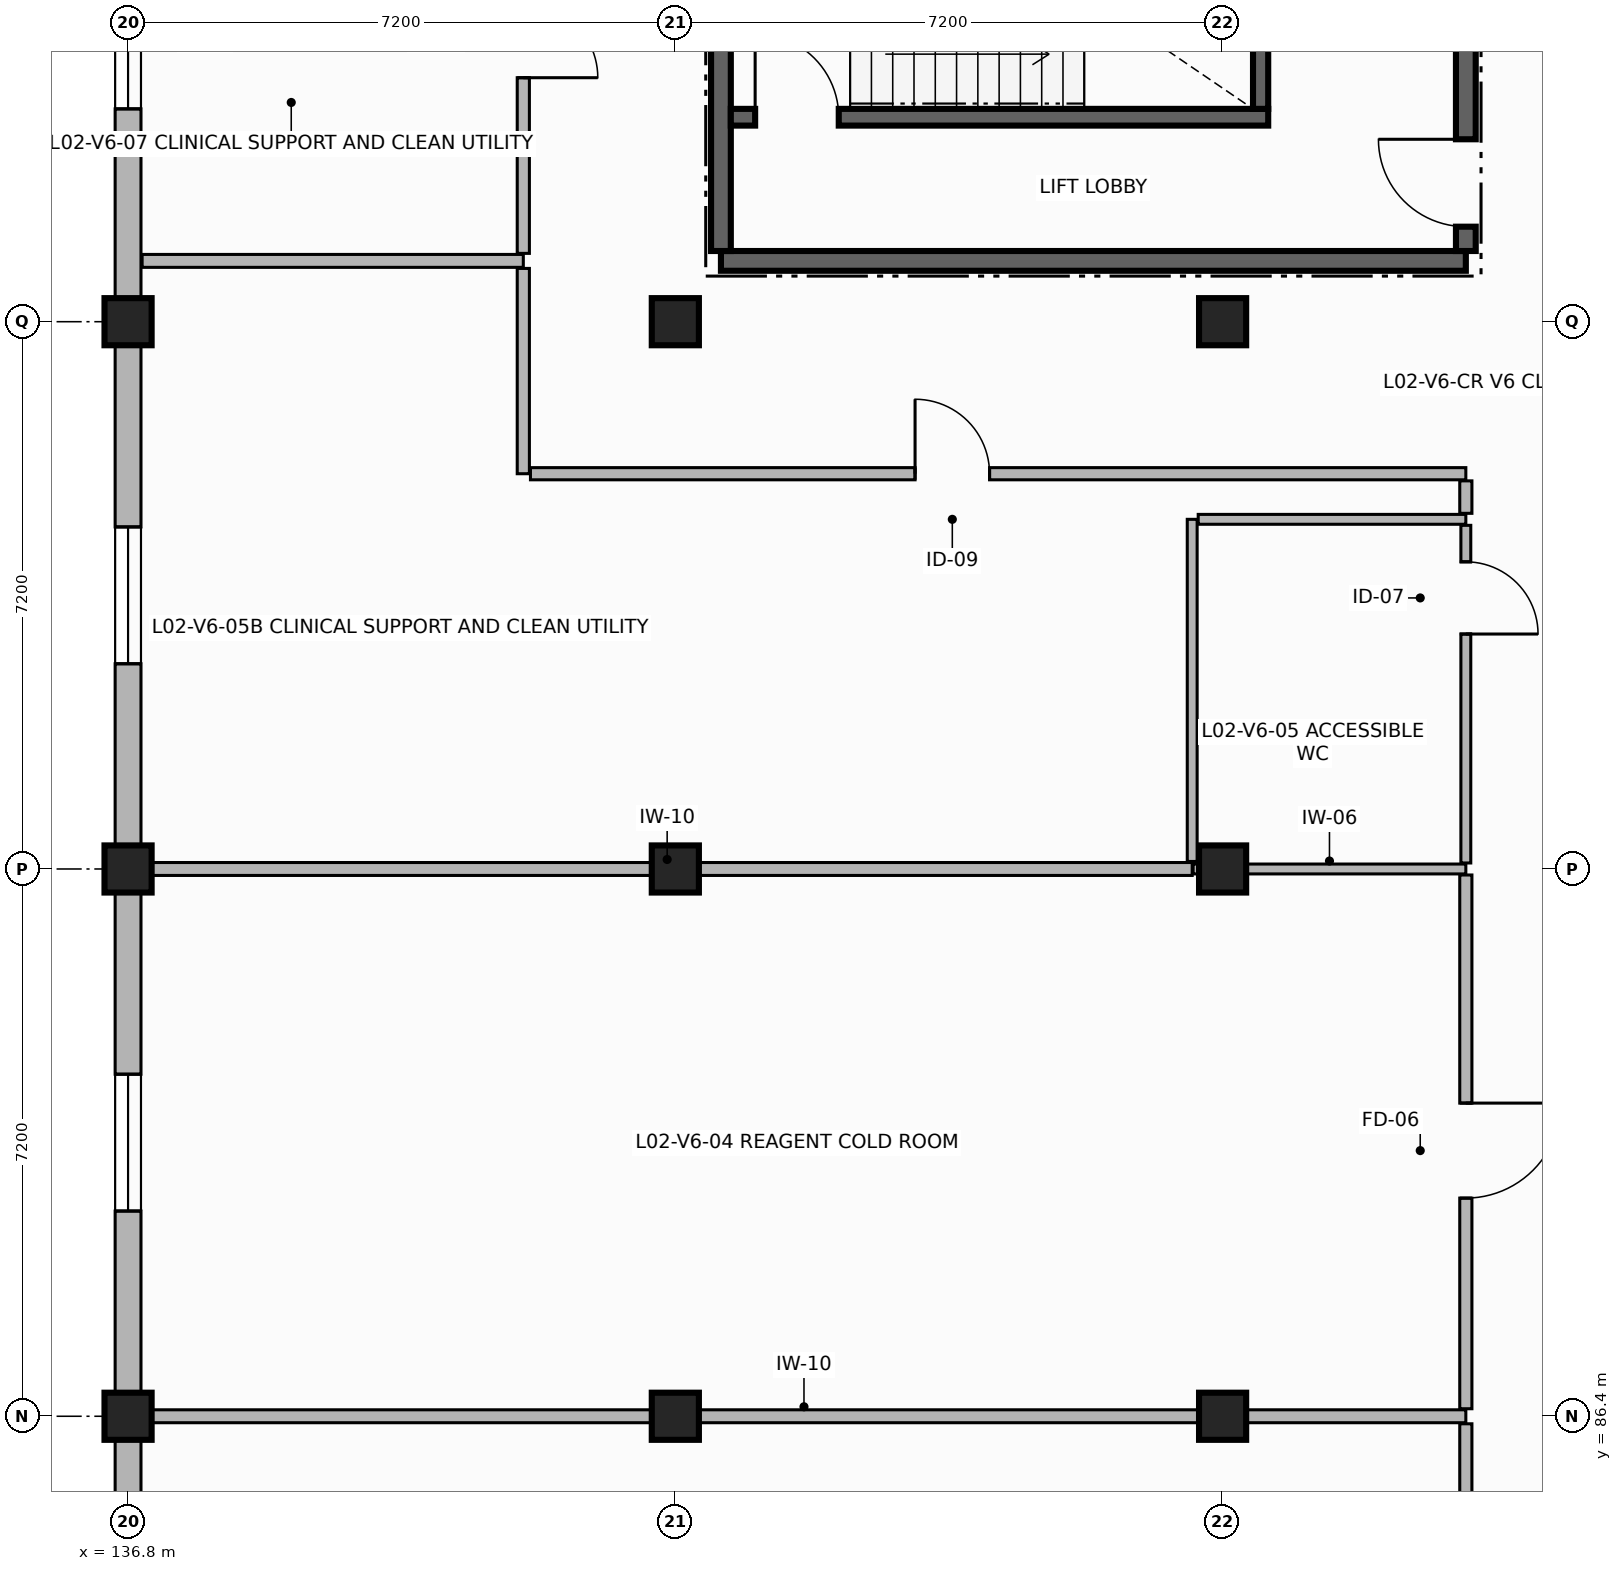
"""IFC4 building model, lengths in metres.
Left out: names, types, materials, properties, quantities, classifications, styles, units other than length and angle.
Written with IfcOpenShell. Run it as: python <this file> out.ifc"""

import sys

from ifc_helpers import new_model, si_unit, direction, frame, frame_2d, origin, origin_2d, place, context, subcontext, project, spatial, rectangle, extrude, element, fill, save


model = new_model("IFC4")
c1 = context("Model", 3, precision=1e-05, world=origin(), true_north=direction((0.0, 1.0)))
c2 = subcontext(c1, "Body", "Model", "MODEL_VIEW")
j1 = project(units=[si_unit("LENGTHUNIT", "METRE"), si_unit("PLANEANGLEUNIT", "RADIAN")], contexts=[c1])
p1 = place(None, origin())
s1 = spatial("IfcSite", under=j1, at=p1, CompositionType="ELEMENT")
p2 = place(p1, origin())
s2 = spatial("IfcBuilding", under=s1, at=p2, CompositionType="ELEMENT")
p3 = place(p2, frame((0.0, 0.0, 8.4)))
s3 = spatial("IfcBuildingStorey", under=s2, at=p3, CompositionType="ELEMENT", Elevation=8.4)
for number, where, z_axis, x_axis in (
    (1, (136.8, 86.4, 0.0), (0.0, 0.0, 1.0), (1.0, 0.0, 0.0)),
    (2, (136.8, 93.6, 0.0), (0.0, 0.0, 1.0), (1.0, 0.0, 0.0)),
    (3, (136.8, 100.8, 0.0), (0.0, 0.0, 1.0), (1.0, 0.0, 0.0)),
    (4, (144.0, 86.4, 0.0), (0.0, 0.0, 1.0), (1.0, 0.0, 0.0)),
    (5, (144.0, 93.6, 0.0), (0.0, 0.0, 1.0), (1.0, 0.0, 0.0)),
    (6, (144.0, 100.8, 0.0), (0.0, 0.0, 1.0), (1.0, 0.0, 0.0)),
    (7, (151.2, 86.4, 0.0), (0.0, 0.0, 1.0), (1.0, 0.0, 0.0)),
    (8, (151.2, 93.6, 0.0), (0.0, 0.0, 1.0), (1.0, 0.0, 0.0)),
    (9, (151.2, 100.8, 0.0), (0.0, 0.0, 1.0), (1.0, 0.0, 0.0)),
):
    element("IfcColumn", number, at=place(p3, frame(where, z_axis=z_axis, x_axis=x_axis)), inside=s3, PredefinedType="COLUMN", context=c2, shape_type="SweptSolid", body=[
        extrude(rectangle(XDim=0.62, YDim=0.62, at=origin_2d()), origin(), (0.0, 0.0, 1.0), 3.58),
    ])
p4 = place(p3, frame((136.8, 108.0, 0.0), z_axis=(0.0, 0.0, 1.0), x_axis=(0.0, -1.0, 0.0)))
e10 = element("IfcWall", 10, at=p4, inside=s3, PredefinedType="SOLIDWALL", context=c2, shape_type="SweptSolid", body=[
    extrude(rectangle(XDim=7.2, YDim=0.34, at=frame_2d((3.6, 0.0))), origin(), (0.0, 0.0, 1.0), 2.91),
])
p5 = place(p4, frame((2.6, 0.0, 0.85)))
e11 = element("IfcOpeningElement", 11, at=p5, cuts=e10, PredefinedType="OPENING", context=c2, shape_type="SweptSolid", body=[
    extrude(rectangle(XDim=1.8, YDim=1.85, at=frame_2d((0.9, 0.925))), frame((0.0, 0.18, 0.0), z_axis=(0.0, -1.0, 0.0), x_axis=(1.0, 0.0, 0.0)), (0.0, 0.0, 1.0), 0.36),
])
p6 = place(p3, frame((136.8, 100.8, 0.0), z_axis=(0.0, 0.0, 1.0), x_axis=(0.0, -1.0, 0.0)))
e12 = element("IfcWall", 12, at=p6, inside=s3, PredefinedType="SOLIDWALL", context=c2, shape_type="SweptSolid", body=[
    extrude(rectangle(XDim=7.2, YDim=0.34, at=frame_2d((3.6, 0.0))), origin(), (0.0, 0.0, 1.0), 2.91),
])
p7 = place(p6, frame((2.7, 0.0, 0.85)))
e13 = element("IfcOpeningElement", 13, at=p7, cuts=e12, PredefinedType="OPENING", context=c2, shape_type="SweptSolid", body=[
    extrude(rectangle(XDim=1.8, YDim=1.85, at=frame_2d((0.9, 0.925))), frame((0.0, 0.18, 0.0), z_axis=(0.0, -1.0, 0.0), x_axis=(1.0, 0.0, 0.0)), (0.0, 0.0, 1.0), 0.36),
])
p8 = place(p3, frame((136.8, 93.6, 0.0), z_axis=(0.0, 0.0, 1.0), x_axis=(0.0, -1.0, 0.0)))
e14 = element("IfcWall", 14, at=p8, inside=s3, PredefinedType="SOLIDWALL", context=c2, shape_type="SweptSolid", body=[
    extrude(rectangle(XDim=7.2, YDim=0.34, at=frame_2d((3.6, 0.0))), origin(), (0.0, 0.0, 1.0), 2.91),
])
p9 = place(p8, frame((2.7, 0.0, 0.85)))
e15 = element("IfcOpeningElement", 15, at=p9, cuts=e14, PredefinedType="OPENING", context=c2, shape_type="SweptSolid", body=[
    extrude(rectangle(XDim=1.8, YDim=1.85, at=frame_2d((0.9, 0.925))), frame((0.0, 0.18, 0.0), z_axis=(0.0, -1.0, 0.0), x_axis=(1.0, 0.0, 0.0)), (0.0, 0.0, 1.0), 0.36),
])
p10 = place(p3, frame((136.8, 86.4, 0.0), z_axis=(0.0, 0.0, 1.0), x_axis=(0.0, -1.0, 0.0)))
e16 = element("IfcWall", 16, at=p10, inside=s3, PredefinedType="SOLIDWALL", context=c2, shape_type="SweptSolid", body=[
    extrude(rectangle(XDim=7.2, YDim=0.34, at=frame_2d((3.6, 0.0))), origin(), (0.0, 0.0, 1.0), 2.91),
])
p11 = place(p10, frame((2.7, 0.0, 0.85)))
e17 = element("IfcOpeningElement", 17, at=p11, cuts=e16, PredefinedType="OPENING", context=c2, shape_type="SweptSolid", body=[
    extrude(rectangle(XDim=1.8, YDim=1.85, at=frame_2d((0.9, 0.925))), frame((0.0, 0.18, 0.0), z_axis=(0.0, -1.0, 0.0), x_axis=(1.0, 0.0, 0.0)), (0.0, 0.0, 1.0), 0.36),
])
p12 = place(p3, frame((144.6, 101.6, 0.0), z_axis=(0.0, 0.0, 1.0), x_axis=(1.0, 0.0, 0.0)))
e18 = element("IfcWall", 18, at=p12, inside=s3, PredefinedType="SHEAR", context=c2, shape_type="SweptSolid", body=[
    extrude(rectangle(XDim=9.8, YDim=0.26, at=frame_2d((4.9, 0.0))), origin(), (0.0, 0.0, 1.0), 3.58),
])
p13 = place(p3, frame((154.4, 101.73, 0.0), z_axis=(0.0, 0.0, 1.0), x_axis=(0.0, 1.0, 0.0)))
e19 = element("IfcWall", 19, at=p13, inside=s3, PredefinedType="SHEAR", context=c2, shape_type="SweptSolid", body=[
    extrude(rectangle(XDim=5.54, YDim=0.26, at=frame_2d((2.77, 0.0))), origin(), (0.0, 0.0, 1.0), 3.58),
])
p14 = place(p13, frame((0.32, 0.0, 0.0)))
e20 = element("IfcOpeningElement", 20, at=p14, cuts=e19, PredefinedType="OPENING", context=c2, shape_type="SweptSolid", body=[
    extrude(rectangle(XDim=1.15, YDim=2.2, at=frame_2d((0.575, 1.1))), frame((0.0, 0.14, 0.0), z_axis=(0.0, -1.0, 0.0), x_axis=(1.0, 0.0, 0.0)), (0.0, 0.0, 1.0), 0.28),
])
p15 = place(p3, frame((144.6, 107.27, 0.0), z_axis=(0.0, 0.0, 1.0), x_axis=(0.0, -1.0, 0.0)))
e21 = element("IfcWall", 21, at=p15, inside=s3, PredefinedType="SHEAR", context=c2, shape_type="SweptSolid", body=[
    extrude(rectangle(XDim=5.54, YDim=0.26, at=frame_2d((2.77, 0.0))), origin(), (0.0, 0.0, 1.0), 3.58),
])
p16 = place(p3, frame((144.73, 103.49, 0.0), z_axis=(0.0, 0.0, 1.0), x_axis=(1.0, 0.0, 0.0)))
e22 = element("IfcWall", 22, at=p16, inside=s3, PredefinedType="SHEAR", context=c2, shape_type="SweptSolid", body=[
    extrude(rectangle(XDim=7.07, YDim=0.22, at=frame_2d((3.535, 0.0))), origin(), (0.0, 0.0, 1.0), 3.58),
])
p17 = place(p16, frame((0.32, 0.0, 0.0)))
e23 = element("IfcOpeningElement", 23, at=p17, cuts=e22, PredefinedType="OPENING", context=c2, shape_type="SweptSolid", body=[
    extrude(rectangle(XDim=1.1, YDim=2.15, at=frame_2d((0.55, 1.075))), frame((0.0, 0.12, 0.0), z_axis=(0.0, -1.0, 0.0), x_axis=(1.0, 0.0, 0.0)), (0.0, 0.0, 1.0), 0.24),
])
p18 = place(p3, frame((151.7, 103.6, 0.0), z_axis=(0.0, 0.0, 1.0), x_axis=(0.0, 1.0, 0.0)))
e24 = element("IfcWall", 24, at=p18, inside=s3, PredefinedType="SHEAR", context=c2, shape_type="SweptSolid", body=[
    extrude(rectangle(XDim=3.67, YDim=0.2, at=frame_2d((1.835, 0.0))), origin(), (0.0, 0.0, 1.0), 3.58),
])
p19 = place(p3, frame((136.985, 86.4, 0.0), z_axis=(0.0, 0.0, 1.0), x_axis=(1.0, 0.0, 0.0)))
e25 = element("IfcWall", 25, at=p19, inside=s3, PredefinedType="PARTITIONING", context=c2, shape_type="SweptSolid", body=[
    extrude(rectangle(XDim=17.415, YDim=0.17, at=frame_2d((8.708, 0.0))), origin(), (0.0, 0.0, 1.0), 2.89),
])
p20 = place(p3, frame((154.4, 86.301, 0.0), z_axis=(0.0, 0.0, 1.0), x_axis=(0.0, -1.0, 0.0)))
e26 = element("IfcWall", 26, at=p20, inside=s3, PredefinedType="PARTITIONING", context=c2, shape_type="SweptSolid", body=[
    extrude(rectangle(XDim=7.556, YDim=0.16, at=frame_2d((3.778, 0.0))), origin(), (0.0, 0.0, 1.0), 2.89),
])
p21 = place(p20, frame((2.848, 0.0, 0.0)))
e27 = element("IfcOpeningElement", 27, at=p21, cuts=e26, PredefinedType="OPENING", context=c2, shape_type="SweptSolid", body=[
    extrude(rectangle(XDim=1.15, YDim=2.25, at=frame_2d((0.575, 1.125))), frame((0.0, 0.09, 0.0), z_axis=(0.0, -1.0, 0.0), x_axis=(1.0, 0.0, 0.0)), (0.0, 0.0, 1.0), 0.18),
])
p22 = place(p3, frame((136.985, 93.6, 0.0), z_axis=(0.0, 0.0, 1.0), x_axis=(1.0, 0.0, 0.0)))
e28 = element("IfcWall", 28, at=p22, inside=s3, PredefinedType="PARTITIONING", context=c2, shape_type="SweptSolid", body=[
    extrude(rectangle(XDim=13.815, YDim=0.17, at=frame_2d((6.907, 0.0))), origin(), (0.0, 0.0, 1.0), 2.89),
])
p23 = place(p3, frame((150.812, 93.6, 0.0), z_axis=(0.0, 0.0, 1.0), x_axis=(1.0, 0.0, 0.0)))
e29 = element("IfcWall", 29, at=p23, inside=s3, PredefinedType="PARTITIONING", context=c2, shape_type="SweptSolid", body=[
    extrude(rectangle(XDim=3.588, YDim=0.13, at=frame_2d((1.794, 0.0))), origin(), (0.0, 0.0, 1.0), 2.89),
])
p24 = place(p3, frame((154.4, 93.521, 0.0), z_axis=(0.0, 0.0, 1.0), x_axis=(0.0, -1.0, 0.0)))
e30 = element("IfcWall", 30, at=p24, inside=s3, PredefinedType="PARTITIONING", context=c2, shape_type="SweptSolid", body=[
    extrude(rectangle(XDim=7.022, YDim=0.16, at=frame_2d((3.511, 0.0))), origin(), (0.0, 0.0, 1.0), 2.89),
])
p25 = place(p24, frame((3.001, 0.0, 0.0)))
e31 = element("IfcOpeningElement", 31, at=p25, cuts=e30, PredefinedType="OPENING", context=c2, shape_type="SweptSolid", body=[
    extrude(rectangle(XDim=1.25, YDim=2.2, at=frame_2d((0.625, 1.1))), frame((0.0, 0.09, 0.0), z_axis=(0.0, -1.0, 0.0), x_axis=(1.0, 0.0, 0.0)), (0.0, 0.0, 1.0), 0.18),
])
p26 = place(p3, frame((150.8, 93.699, 0.0), z_axis=(0.0, 0.0, 1.0), x_axis=(0.0, 1.0, 0.0)))
e32 = element("IfcWall", 32, at=p26, inside=s3, PredefinedType="PARTITIONING", context=c2, shape_type="SweptSolid", body=[
    extrude(rectangle(XDim=4.501, YDim=0.13, at=frame_2d((2.25, 0.0))), origin(), (0.0, 0.0, 1.0), 2.89),
])
p27 = place(p3, frame((150.879, 98.2, 0.0), z_axis=(0.0, 0.0, 1.0), x_axis=(1.0, 0.0, 0.0)))
e33 = element("IfcWall", 33, at=p27, inside=s3, PredefinedType="PARTITIONING", context=c2, shape_type="SweptSolid", body=[
    extrude(rectangle(XDim=3.521, YDim=0.13, at=frame_2d((1.76, 0.0))), origin(), (0.0, 0.0, 1.0), 2.89),
])
p28 = place(p3, frame((154.4, 98.121, 0.0), z_axis=(0.0, 0.0, 1.0), x_axis=(0.0, -1.0, 0.0)))
e34 = element("IfcWall", 34, at=p28, inside=s3, PredefinedType="PARTITIONING", context=c2, shape_type="SweptSolid", body=[
    extrude(rectangle(XDim=4.442, YDim=0.13, at=frame_2d((2.221, 0.0))), origin(), (0.0, 0.0, 1.0), 2.89),
])
p29 = place(p28, frame((0.48, 0.0, 0.0)))
e35 = element("IfcOpeningElement", 35, at=p29, cuts=e34, PredefinedType="OPENING", context=c2, shape_type="SweptSolid", body=[
    extrude(rectangle(XDim=0.95, YDim=2.1, at=frame_2d((0.475, 1.05))), frame((0.0, 0.075, 0.0), z_axis=(0.0, -1.0, 0.0), x_axis=(1.0, 0.0, 0.0)), (0.0, 0.0, 1.0), 0.15),
])
p30 = place(p3, frame((136.985, 101.6, 0.0), z_axis=(0.0, 0.0, 1.0), x_axis=(1.0, 0.0, 0.0)))
e36 = element("IfcWall", 36, at=p30, inside=s3, PredefinedType="PARTITIONING", context=c2, shape_type="SweptSolid", body=[
    extrude(rectangle(XDim=5.015, YDim=0.17, at=frame_2d((2.507, 0.0))), origin(), (0.0, 0.0, 1.0), 2.89),
])
p31 = place(p3, frame((142.0, 101.501, 0.0), z_axis=(0.0, 0.0, 1.0), x_axis=(0.0, -1.0, 0.0)))
e37 = element("IfcWall", 37, at=p31, inside=s3, PredefinedType="PARTITIONING", context=c2, shape_type="SweptSolid", body=[
    extrude(rectangle(XDim=2.701, YDim=0.16, at=frame_2d((1.351, 0.0))), origin(), (0.0, 0.0, 1.0), 2.89),
])
p32 = place(p3, frame((142.094, 98.8, 0.0), z_axis=(0.0, 0.0, 1.0), x_axis=(1.0, 0.0, 0.0)))
e38 = element("IfcWall", 38, at=p32, inside=s3, PredefinedType="PARTITIONING", context=c2, shape_type="SweptSolid", body=[
    extrude(rectangle(XDim=12.306, YDim=0.16, at=frame_2d((6.153, 0.0))), origin(), (0.0, 0.0, 1.0), 2.89),
])
p33 = place(p32, frame((5.06, 0.0, 0.0)))
e39 = element("IfcOpeningElement", 39, at=p33, cuts=e38, PredefinedType="OPENING", context=c2, shape_type="SweptSolid", body=[
    extrude(rectangle(XDim=0.98, YDim=2.15, at=frame_2d((0.49, 1.075))), frame((0.0, 0.09, 0.0), z_axis=(0.0, -1.0, 0.0), x_axis=(1.0, 0.0, 0.0)), (0.0, 0.0, 1.0), 0.18),
])
p34 = place(p3, frame((154.4, 98.706, 0.0), z_axis=(0.0, 0.0, 1.0), x_axis=(0.0, -1.0, 0.0)))
e40 = element("IfcWall", 40, at=p34, inside=s3, PredefinedType="PARTITIONING", context=c2, shape_type="SweptSolid", body=[
    extrude(rectangle(XDim=0.427, YDim=0.16, at=frame_2d((0.213, 0.0))), origin(), (0.0, 0.0, 1.0), 2.89),
])
p35 = place(p3, frame((142.0, 107.301, 0.0), z_axis=(0.0, 0.0, 1.0), x_axis=(0.0, -1.0, 0.0)))
e41 = element("IfcWall", 41, at=p35, inside=s3, PredefinedType="PARTITIONING", context=c2, shape_type="SweptSolid", body=[
    extrude(rectangle(XDim=5.602, YDim=0.16, at=frame_2d((2.801, 0.0))), origin(), (0.0, 0.0, 1.0), 2.89),
])
p36 = place(p35, frame((2.311, 0.0, 0.0)))
e42 = element("IfcOpeningElement", 42, at=p36, cuts=e41, PredefinedType="OPENING", context=c2, shape_type="SweptSolid", body=[
    extrude(rectangle(XDim=0.98, YDim=2.15, at=frame_2d((0.49, 1.075))), frame((0.0, 0.09, 0.0), z_axis=(0.0, -1.0, 0.0), x_axis=(1.0, 0.0, 0.0)), (0.0, 0.0, 1.0), 0.18),
])
p37 = place(p5, origin())
e43 = element("IfcWindow", 43, at=p37, inside=s3, PartitioningType="SINGLE_PANEL", PredefinedType="WINDOW", context=c2, shape_type="SweptSolid", body=[
    extrude(rectangle(XDim=1.8, YDim=1.85, at=frame_2d((0.9, 0.925))), frame((0.0, 0.03, 0.0), z_axis=(0.0, -1.0, 0.0), x_axis=(1.0, 0.0, 0.0)), (0.0, 0.0, 1.0), 0.06),
])
fill(e11, e43)
p38 = place(p7, origin())
e44 = element("IfcWindow", 44, at=p38, inside=s3, PartitioningType="SINGLE_PANEL", PredefinedType="WINDOW", context=c2, shape_type="SweptSolid", body=[
    extrude(rectangle(XDim=1.8, YDim=1.85, at=frame_2d((0.9, 0.925))), frame((0.0, 0.03, 0.0), z_axis=(0.0, -1.0, 0.0), x_axis=(1.0, 0.0, 0.0)), (0.0, 0.0, 1.0), 0.06),
])
fill(e13, e44)
p39 = place(p9, origin())
e45 = element("IfcWindow", 45, at=p39, inside=s3, PartitioningType="SINGLE_PANEL", PredefinedType="WINDOW", context=c2, shape_type="SweptSolid", body=[
    extrude(rectangle(XDim=1.8, YDim=1.85, at=frame_2d((0.9, 0.925))), frame((0.0, 0.03, 0.0), z_axis=(0.0, -1.0, 0.0), x_axis=(1.0, 0.0, 0.0)), (0.0, 0.0, 1.0), 0.06),
])
fill(e15, e45)
p40 = place(p17, origin())
e46 = element("IfcDoor", 46, at=p40, inside=s3, OperationType="SINGLE_SWING_LEFT", PredefinedType="DOOR", context=c2, shape_type="SweptSolid", body=[
    extrude(rectangle(XDim=1.1, YDim=2.15, at=frame_2d((0.55, 1.075))), frame((0.0, 0.025, 0.0), z_axis=(0.0, -1.0, 0.0), x_axis=(1.0, 0.0, 0.0)), (0.0, 0.0, 1.0), 0.05),
])
fill(e23, e46)
p41 = place(p14, origin())
e47 = element("IfcDoor", 47, at=p41, inside=s3, OperationType="SINGLE_SWING_RIGHT", PredefinedType="DOOR", context=c2, shape_type="SweptSolid", body=[
    extrude(rectangle(XDim=1.15, YDim=2.2, at=frame_2d((0.575, 1.1))), frame((0.0, 0.025, 0.0), z_axis=(0.0, -1.0, 0.0), x_axis=(1.0, 0.0, 0.0)), (0.0, 0.0, 1.0), 0.05),
])
fill(e20, e47)
p42 = place(p25, origin())
e48 = element("IfcDoor", 48, at=p42, inside=s3, OperationType="SINGLE_SWING_LEFT", PredefinedType="DOOR", context=c2, shape_type="SweptSolid", body=[
    extrude(rectangle(XDim=1.25, YDim=2.2, at=frame_2d((0.625, 1.1))), frame((0.0, 0.025, 0.0), z_axis=(0.0, -1.0, 0.0), x_axis=(1.0, 0.0, 0.0)), (0.0, 0.0, 1.0), 0.05),
])
fill(e31, e48)
p43 = place(p29, origin())
e49 = element("IfcDoor", 49, at=p43, inside=s3, OperationType="SINGLE_SWING_RIGHT", PredefinedType="DOOR", context=c2, shape_type="SweptSolid", body=[
    extrude(rectangle(XDim=0.95, YDim=2.1, at=frame_2d((0.475, 1.05))), frame((0.0, 0.025, 0.0), z_axis=(0.0, -1.0, 0.0), x_axis=(1.0, 0.0, 0.0)), (0.0, 0.0, 1.0), 0.05),
])
fill(e35, e49)
p44 = place(p33, origin())
e50 = element("IfcDoor", 50, at=p44, inside=s3, OperationType="SINGLE_SWING_LEFT", PredefinedType="DOOR", context=c2, shape_type="SweptSolid", body=[
    extrude(rectangle(XDim=0.98, YDim=2.15, at=frame_2d((0.49, 1.075))), frame((0.0, 0.025, 0.0), z_axis=(0.0, -1.0, 0.0), x_axis=(1.0, 0.0, 0.0)), (0.0, 0.0, 1.0), 0.05),
])
fill(e39, e50)
p45 = place(p36, origin())
e51 = element("IfcDoor", 51, at=p45, inside=s3, OperationType="SINGLE_SWING_RIGHT", PredefinedType="DOOR", context=c2, shape_type="SweptSolid", body=[
    extrude(rectangle(XDim=0.98, YDim=2.15, at=frame_2d((0.49, 1.075))), frame((0.0, 0.025, 0.0), z_axis=(0.0, -1.0, 0.0), x_axis=(1.0, 0.0, 0.0)), (0.0, 0.0, 1.0), 0.05),
])
fill(e42, e51)
save(model, sys.argv[1])
